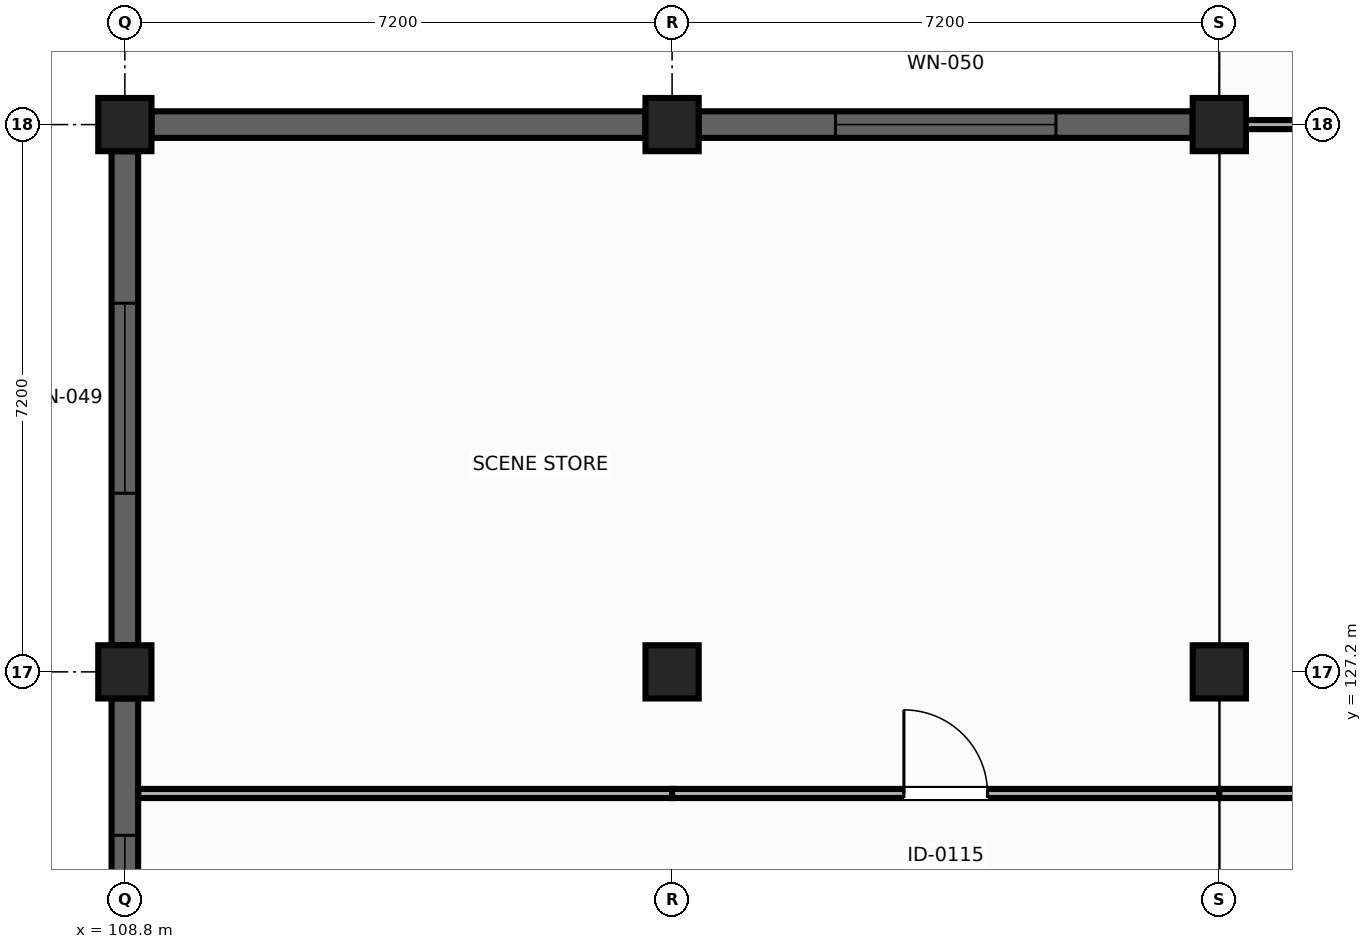
"""IFC4 building model, lengths in metres.
Left out: names, types, materials, properties, quantities, classifications, styles, units other than length and angle.
Written with IfcOpenShell. Run it as: python <this file> out.ifc"""

import sys

from ifc_helpers import new_model, si_unit, direction, frame, frame_2d, origin, origin_2d, place, context, subcontext, project, spatial, rectangle, extrude, element, fill, save


model = new_model("IFC4")
c1 = context("Model", 3, precision=1e-05, world=origin(), true_north=direction((0.0, 1.0)))
c2 = subcontext(c1, "Body", "Model", "MODEL_VIEW")
j1 = project(units=[si_unit("LENGTHUNIT", "METRE"), si_unit("PLANEANGLEUNIT", "RADIAN")], contexts=[c1])
p1 = place(None, origin())
s1 = spatial("IfcSite", under=j1, at=p1, CompositionType="ELEMENT")
p2 = place(p1, origin())
s2 = spatial("IfcBuilding", under=s1, at=p2, CompositionType="ELEMENT")
p3 = place(p2, origin())
s3 = spatial("IfcBuildingStorey", under=s2, at=p3, CompositionType="ELEMENT", Elevation=0.0)
for number, where, z_axis, x_axis in (
    (1, (108.8, 127.2, 0.0), (0.0, 0.0, 1.0), (1.0, 0.0, 0.0)),
    (2, (116.0, 127.2, 0.0), (0.0, 0.0, 1.0), (0.0, 1.0, 0.0)),
    (3, (123.2, 127.2, 0.0), (0.0, 0.0, 1.0), (1.0, 0.0, 0.0)),
    (4, (108.8, 134.4, 0.0), (0.0, 0.0, 1.0), (0.0, 1.0, 0.0)),
    (5, (116.0, 134.4, 0.0), (0.0, 0.0, 1.0), (1.0, 0.0, 0.0)),
    (6, (123.2, 134.4, 0.0), (0.0, 0.0, 1.0), (0.0, 1.0, 0.0)),
):
    element("IfcColumn", number, at=place(p3, frame(where, z_axis=z_axis, x_axis=x_axis)), inside=s3, PredefinedType="COLUMN", context=c2, shape_type="SweptSolid", body=[
        extrude(rectangle(XDim=0.7, YDim=0.7, at=origin_2d()), origin(), (0.0, 0.0, 1.0), 5.4),
    ])
p4 = place(p3, frame((108.8, 120.35, 0.0), z_axis=(0.0, 0.0, 1.0), x_axis=(0.0, 1.0, 0.0)))
e7 = element("IfcWall", 7, at=p4, inside=s3, PredefinedType="SOLIDWALL", context=c2, shape_type="SweptSolid", body=[
    extrude(rectangle(XDim=6.5, YDim=0.35, at=frame_2d((3.25, 0.0))), origin(), (0.0, 0.0, 1.0), 5.12),
])
p5 = place(p4, frame((2.6, 0.0, 0.9)))
e8 = element("IfcOpeningElement", 8, at=p5, cuts=e7, PredefinedType="OPENING", context=c2, shape_type="SweptSolid", body=[
    extrude(rectangle(XDim=2.1, YDim=1.6, at=frame_2d((1.05, 0.8))), frame((0.0, 0.185, 0.0), z_axis=(0.0, -1.0, 0.0), x_axis=(1.0, 0.0, 0.0)), (0.0, 0.0, 1.0), 0.37),
])
p6 = place(p3, frame((108.8, 127.55, 0.0), z_axis=(0.0, 0.0, 1.0), x_axis=(0.0, 1.0, 0.0)))
e9 = element("IfcWall", 9, at=p6, inside=s3, PredefinedType="SOLIDWALL", context=c2, shape_type="SweptSolid", body=[
    extrude(rectangle(XDim=6.5, YDim=0.35, at=frame_2d((3.25, 0.0))), origin(), (0.0, 0.0, 1.0), 5.12),
])
p7 = place(p6, frame((2.0, 0.0, 0.9)))
e10 = element("IfcOpeningElement", 10, at=p7, cuts=e9, PredefinedType="OPENING", context=c2, shape_type="SweptSolid", body=[
    extrude(rectangle(XDim=2.5, YDim=1.6, at=frame_2d((1.25, 0.8))), frame((0.0, 0.185, 0.0), z_axis=(0.0, -1.0, 0.0), x_axis=(1.0, 0.0, 0.0)), (0.0, 0.0, 1.0), 0.37),
])
p8 = place(p3, frame((109.15, 134.4, 0.0), z_axis=(0.0, 0.0, 1.0), x_axis=(1.0, 0.0, 0.0)))
e11 = element("IfcWall", 11, at=p8, inside=s3, PredefinedType="SOLIDWALL", context=c2, shape_type="SweptSolid", body=[
    extrude(rectangle(XDim=6.5, YDim=0.35, at=frame_2d((3.25, 0.0))), origin(), (0.0, 0.0, 1.0), 5.12),
])
p9 = place(p3, frame((116.35, 134.4, 0.0), z_axis=(0.0, 0.0, 1.0), x_axis=(1.0, 0.0, 0.0)))
e12 = element("IfcWall", 12, at=p9, inside=s3, PredefinedType="SOLIDWALL", context=c2, shape_type="SweptSolid", body=[
    extrude(rectangle(XDim=6.5, YDim=0.35, at=frame_2d((3.25, 0.0))), origin(), (0.0, 0.0, 1.0), 5.12),
])
p10 = place(p9, frame((1.8, 0.0, 0.9)))
e13 = element("IfcOpeningElement", 13, at=p10, cuts=e12, PredefinedType="OPENING", context=c2, shape_type="SweptSolid", body=[
    extrude(rectangle(XDim=2.9, YDim=1.6, at=frame_2d((1.45, 0.8))), frame((0.0, 0.185, 0.0), z_axis=(0.0, -1.0, 0.0), x_axis=(1.0, 0.0, 0.0)), (0.0, 0.0, 1.0), 0.37),
])
p11 = place(p3, frame((130.05, 134.4, 0.0), z_axis=(0.0, 0.0, 1.0), x_axis=(-1.0, 0.0, 0.0)))
e14 = element("IfcWall", 14, at=p11, inside=s3, PredefinedType="PARTITIONING", context=c2, shape_type="SweptSolid", body=[
    extrude(rectangle(XDim=6.5, YDim=0.12, at=frame_2d((3.25, 0.0))), origin(), (0.0, 0.0, 1.0), 4.315),
])
p12 = place(p3, frame((108.977, 125.6, 0.0), z_axis=(0.0, 0.0, 1.0), x_axis=(1.0, 0.0, 0.0)))
e15 = element("IfcWall", 15, at=p12, inside=s3, PredefinedType="PARTITIONING", context=c2, shape_type="SweptSolid", body=[
    extrude(rectangle(XDim=7.023, YDim=0.12, at=frame_2d((3.511, 0.0))), origin(), (0.0, 0.0, 1.0), 4.315),
])
p13 = place(p3, frame((116.0, 125.6, 0.0), z_axis=(0.0, 0.0, 1.0), x_axis=(1.0, 0.0, 0.0)))
e16 = element("IfcWall", 16, at=p13, inside=s3, PredefinedType="PARTITIONING", context=c2, shape_type="SweptSolid", body=[
    extrude(rectangle(XDim=7.2, YDim=0.12, at=frame_2d((3.6, 0.0))), origin(), (0.0, 0.0, 1.0), 4.315),
])
p14 = place(p13, frame((3.05, 0.0, 0.0)))
e17 = element("IfcOpeningElement", 17, at=p14, cuts=e16, PredefinedType="OPENING", context=c2, shape_type="SweptSolid", body=[
    extrude(rectangle(XDim=1.1, YDim=2.15, at=frame_2d((0.55, 1.075))), frame((0.0, 0.07, 0.0), z_axis=(0.0, -1.0, 0.0), x_axis=(1.0, 0.0, 0.0)), (0.0, 0.0, 1.0), 0.14),
])
p15 = place(p3, frame((123.2, 125.6, 0.0), z_axis=(0.0, 0.0, 1.0), x_axis=(1.0, 0.0, 0.0)))
e18 = element("IfcWall", 18, at=p15, inside=s3, PredefinedType="PARTITIONING", context=c2, shape_type="SweptSolid", body=[
    extrude(rectangle(XDim=7.138, YDim=0.12, at=frame_2d((3.569, 0.0))), origin(), (0.0, 0.0, 1.0), 4.315),
])
p16 = place(p5, origin())
e19 = element("IfcWindow", 19, at=p16, inside=s3, PartitioningType="SINGLE_PANEL", PredefinedType="WINDOW", context=c2, shape_type="SweptSolid", body=[
    extrude(rectangle(XDim=2.1, YDim=1.6, at=frame_2d((1.05, 0.8))), frame((0.0, 0.03, 0.0), z_axis=(0.0, -1.0, 0.0), x_axis=(1.0, 0.0, 0.0)), (0.0, 0.0, 1.0), 0.06),
])
fill(e8, e19)
p17 = place(p7, origin())
e20 = element("IfcWindow", 20, at=p17, inside=s3, PartitioningType="SINGLE_PANEL", PredefinedType="WINDOW", context=c2, shape_type="SweptSolid", body=[
    extrude(rectangle(XDim=2.5, YDim=1.6, at=frame_2d((1.25, 0.8))), frame((0.0, 0.03, 0.0), z_axis=(0.0, -1.0, 0.0), x_axis=(1.0, 0.0, 0.0)), (0.0, 0.0, 1.0), 0.06),
])
fill(e10, e20)
p18 = place(p10, origin())
e21 = element("IfcWindow", 21, at=p18, inside=s3, PartitioningType="SINGLE_PANEL", PredefinedType="WINDOW", context=c2, shape_type="SweptSolid", body=[
    extrude(rectangle(XDim=2.9, YDim=1.6, at=frame_2d((1.45, 0.8))), frame((0.0, 0.03, 0.0), z_axis=(0.0, -1.0, 0.0), x_axis=(1.0, 0.0, 0.0)), (0.0, 0.0, 1.0), 0.06),
])
fill(e13, e21)
p19 = place(p14, origin())
e22 = element("IfcDoor", 22, at=p19, inside=s3, OperationType="SINGLE_SWING_LEFT", PredefinedType="DOOR", context=c2, shape_type="SweptSolid", body=[
    extrude(rectangle(XDim=1.1, YDim=2.15, at=frame_2d((0.55, 1.075))), frame((0.0, 0.025, 0.0), z_axis=(0.0, -1.0, 0.0), x_axis=(1.0, 0.0, 0.0)), (0.0, 0.0, 1.0), 0.05),
])
fill(e17, e22)
save(model, sys.argv[1])
